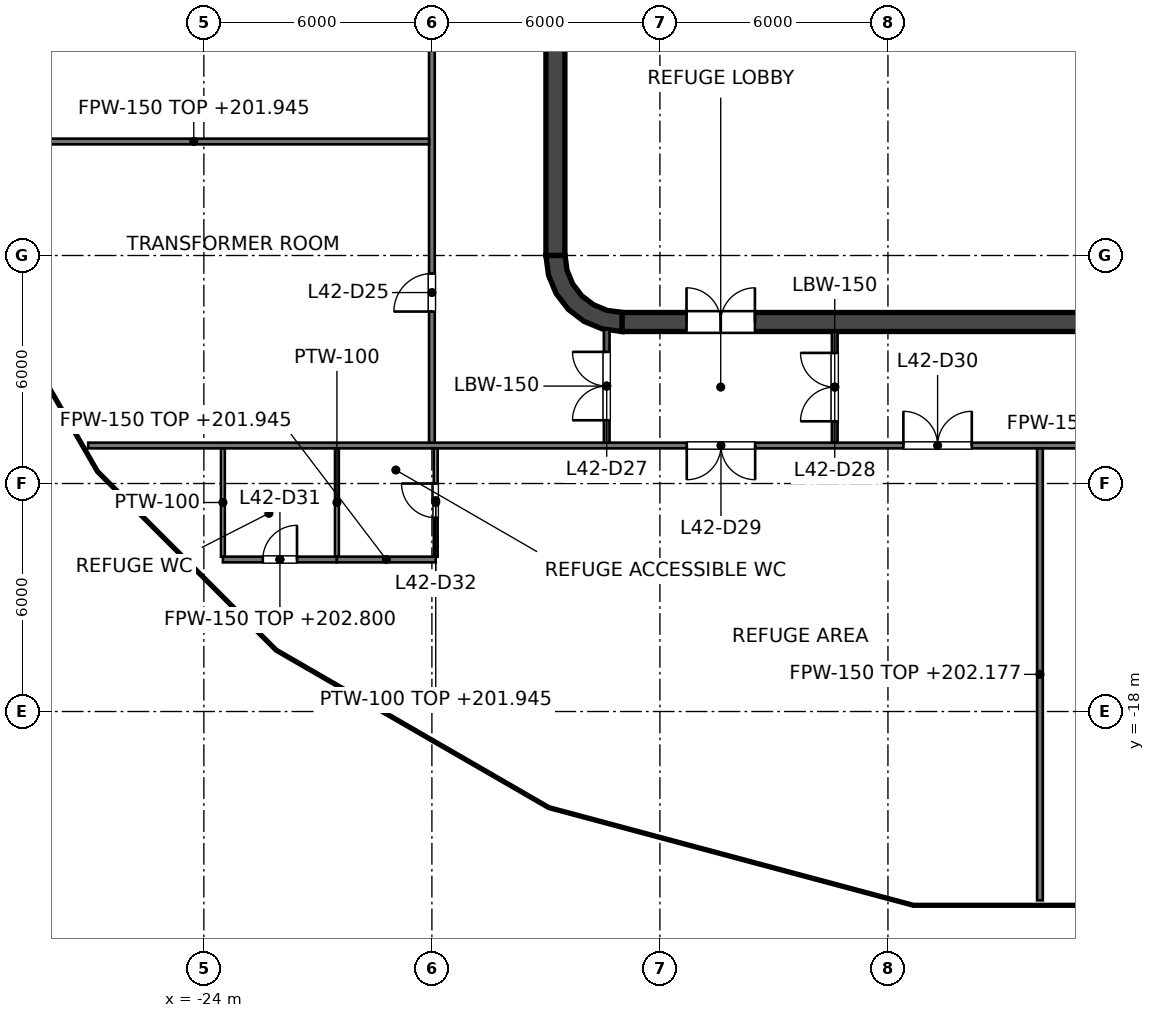
"""IFC4 building model, lengths in metres.
Left out: names, types, materials, properties, quantities, classifications, styles, units other than length and angle.
Written with IfcOpenShell. Run it as: python <this file> out.ifc"""

import sys

from ifc_helpers import new_model, si_unit, direction, frame, frame_2d, origin, place, context, subcontext, project, spatial, polyline, rectangle, outline, extrude, element, fill, save


model = new_model("IFC4")
c1 = context("Model", 3, precision=1e-05, world=origin(), true_north=direction((0.0, 1.0)))
c2 = subcontext(c1, "Body", "Model", "MODEL_VIEW")
j1 = project(units=[si_unit("LENGTHUNIT", "METRE"), si_unit("PLANEANGLEUNIT", "RADIAN")], contexts=[c1])
p1 = place(None, origin())
s1 = spatial("IfcSite", under=j1, at=p1, CompositionType="ELEMENT")
p2 = place(p1, origin())
s2 = spatial("IfcBuilding", under=s1, at=p2, CompositionType="ELEMENT")
p3 = place(p2, frame((0.0, 0.0, 197.6)))
s3 = spatial("IfcBuildingStorey", under=s2, at=p3, CompositionType="ELEMENT", Elevation=197.6)
p4 = place(p3, frame((-13.0, -7.75, 0.0), z_axis=(0.0, 0.0, 1.0), x_axis=(1.0, 0.0, 0.0)))
e1 = element("IfcWall", 1, at=p4, inside=s3, PredefinedType="SHEAR", context=c2, shape_type="SweptSolid", body=[
    extrude(rectangle(XDim=26.0, YDim=0.5, at=frame_2d((13.0, 0.0))), origin(), (0.0, 0.0, 1.0), 5.4),
])
p5 = place(p4, frame((1.7, 0.0, 0.0)))
e2 = element("IfcOpeningElement", 2, at=p5, cuts=e1, PredefinedType="OPENING", context=c2, shape_type="SweptSolid", body=[
    extrude(rectangle(XDim=1.8, YDim=2.1, at=frame_2d((0.9, 1.05))), frame((0.0, 0.25, 0.0), z_axis=(0.0, -1.0, 0.0), x_axis=(1.0, 0.0, 0.0)), (0.0, 0.0, 1.0), 0.5),
])
p6 = place(p4, frame((22.5, 0.0, 0.0)))
e3 = element("IfcOpeningElement", 3, at=p6, cuts=e1, PredefinedType="OPENING", context=c2, shape_type="SweptSolid", body=[
    extrude(rectangle(XDim=1.8, YDim=2.1, at=frame_2d((0.9, 1.05))), frame((0.0, 0.25, 0.0), z_axis=(0.0, -1.0, 0.0), x_axis=(1.0, 0.0, 0.0)), (0.0, 0.0, 1.0), 0.5),
])
p7 = place(p3, frame((-14.75, -6.0, 0.0), z_axis=(0.0, 0.0, 1.0), x_axis=(0.0, 1.0, 0.0)))
e4 = element("IfcWall", 4, at=p7, inside=s3, PredefinedType="SHEAR", context=c2, shape_type="SweptSolid", body=[
    extrude(rectangle(XDim=12.0, YDim=0.5, at=frame_2d((6.0, 0.0))), origin(), (0.0, 0.0, 1.0), 5.4),
])
p8 = place(p3, origin())
e5 = element("IfcWall", 5, at=p8, inside=s3, PredefinedType="SHEAR", context=c2, shape_type="SweptSolid", body=[
    extrude(outline(polyline([(-13.0, -8.0), (-13.0, -7.496), (-13.387, -7.445), (-13.748, -7.295), (-14.058, -7.058), (-14.295, -6.748), (-14.445, -6.387), (-14.496, -6.0), (-15.0, -6.0), (-14.932, -6.518), (-14.732, -7.0), (-14.414, -7.414), (-14.0, -7.732), (-13.518, -7.932), (-13.0, -8.0)])), origin(), (0.0, 0.0, 1.0), 5.4),
])
p9 = place(p3, frame((-9.0, -6.6, 0.0), z_axis=(0.0, 0.0, 1.0), x_axis=(0.0, 1.0, 0.0)))
e6 = element("IfcWall", 6, at=p9, inside=s3, PredefinedType="PARTITIONING", context=c2, shape_type="SweptSolid", body=[
    extrude(rectangle(XDim=2.5, YDim=0.25, at=frame_2d((1.25, 0.0))), origin(), (0.0, 0.0, 1.0), 5.2),
])
p10 = place(p9, frame((0.75, 0.0, 0.0)))
e7 = element("IfcOpeningElement", 7, at=p10, cuts=e6, PredefinedType="OPENING", context=c2, shape_type="SweptSolid", body=[
    extrude(rectangle(XDim=1.0, YDim=2.1, at=frame_2d((0.5, 1.05))), frame((0.0, 0.125, 0.0), z_axis=(0.0, -1.0, 0.0), x_axis=(1.0, 0.0, 0.0)), (0.0, 0.0, 1.0), 0.25),
])
p11 = place(p3, frame((-2.9, -6.6, 0.0), z_axis=(0.0, 0.0, 1.0), x_axis=(0.0, 1.0, 0.0)))
e8 = element("IfcWall", 8, at=p11, inside=s3, PredefinedType="PARTITIONING", context=c2, shape_type="SweptSolid", body=[
    extrude(rectangle(XDim=2.5, YDim=0.25, at=frame_2d((1.25, 0.0))), origin(), (0.0, 0.0, 1.0), 5.2),
])
p12 = place(p11, frame((0.8, 0.0, 0.0)))
e9 = element("IfcOpeningElement", 9, at=p12, cuts=e8, PredefinedType="OPENING", context=c2, shape_type="SweptSolid", body=[
    extrude(rectangle(XDim=0.9, YDim=2.1, at=frame_2d((0.45, 1.05))), frame((0.0, 0.125, 0.0), z_axis=(0.0, -1.0, 0.0), x_axis=(1.0, 0.0, 0.0)), (0.0, 0.0, 1.0), 0.25),
])
p13 = place(p3, frame((-9.125, -7.05, 0.0), z_axis=(0.0, 0.0, 1.0), x_axis=(1.0, 0.0, 0.0)))
e10 = element("IfcWall", 10, at=p13, inside=s3, PredefinedType="SOLIDWALL", context=c2, shape_type="SweptSolid", body=[
    extrude(rectangle(XDim=18.25, YDim=0.9, at=frame_2d((9.125, 0.0))), origin(), (0.0, 0.0, 1.0), 5.2),
])
p14 = place(p3, frame((-9.125, -1.525, 0.0), z_axis=(0.0, 0.0, 1.0), x_axis=(1.0, 0.0, 0.0)))
e11 = element("IfcWall", 11, at=p14, inside=s3, PredefinedType="SOLIDWALL", context=c2, shape_type="SweptSolid", body=[
    extrude(rectangle(XDim=18.25, YDim=0.25, at=frame_2d((9.125, 0.0))), origin(), (0.0, 0.0, 1.0), 5.2),
])
p15 = place(p14, frame((7.15, 0.0, 0.0)))
e12 = element("IfcOpeningElement", 12, at=p15, cuts=e11, PredefinedType="OPENING", context=c2, shape_type="SweptSolid", body=[
    extrude(rectangle(XDim=1.2, YDim=2.1, at=frame_2d((0.6, 1.05))), frame((0.0, 0.125, 0.0), z_axis=(0.0, -1.0, 0.0), x_axis=(1.0, 0.0, 0.0)), (0.0, 0.0, 1.0), 0.25),
])
p16 = place(p14, frame((10.2, 0.0, 0.0)))
e13 = element("IfcOpeningElement", 13, at=p16, cuts=e11, PredefinedType="OPENING", context=c2, shape_type="SweptSolid", body=[
    extrude(rectangle(XDim=1.2, YDim=2.1, at=frame_2d((0.6, 1.05))), frame((0.0, 0.125, 0.0), z_axis=(0.0, -1.0, 0.0), x_axis=(1.0, 0.0, 0.0)), (0.0, 0.0, 1.0), 0.25),
])
p17 = place(p14, frame((16.075, 0.0, 0.0)))
e14 = element("IfcOpeningElement", 14, at=p17, cuts=e11, PredefinedType="OPENING", context=c2, shape_type="SweptSolid", body=[
    extrude(rectangle(XDim=1.0, YDim=2.1, at=frame_2d((0.5, 1.05))), frame((0.0, 0.125, 0.0), z_axis=(0.0, -1.0, 0.0), x_axis=(1.0, 0.0, 0.0)), (0.0, 0.0, 1.0), 0.25),
])
p18 = place(p3, frame((-9.125, -3.975, 0.0), z_axis=(0.0, 0.0, 1.0), x_axis=(1.0, 0.0, 0.0)))
e15 = element("IfcWall", 15, at=p18, inside=s3, PredefinedType="SOLIDWALL", context=c2, shape_type="SweptSolid", body=[
    extrude(rectangle(XDim=12.4, YDim=0.25, at=frame_2d((6.2, 0.0))), origin(), (0.0, 0.0, 1.0), 5.2),
])
p19 = place(p18, frame((1.05, 0.0, 0.0)))
e16 = element("IfcOpeningElement", 16, at=p19, cuts=e15, PredefinedType="OPENING", context=c2, shape_type="SweptSolid", body=[
    extrude(rectangle(XDim=1.2, YDim=2.1, at=frame_2d((0.6, 1.05))), frame((0.0, 0.125, 0.0), z_axis=(0.0, -1.0, 0.0), x_axis=(1.0, 0.0, 0.0)), (0.0, 0.0, 1.0), 0.25),
])
p20 = place(p18, frame((4.1, 0.0, 0.0)))
e17 = element("IfcOpeningElement", 17, at=p20, cuts=e15, PredefinedType="OPENING", context=c2, shape_type="SweptSolid", body=[
    extrude(rectangle(XDim=1.2, YDim=2.1, at=frame_2d((0.6, 1.05))), frame((0.0, 0.125, 0.0), z_axis=(0.0, -1.0, 0.0), x_axis=(1.0, 0.0, 0.0)), (0.0, 0.0, 1.0), 0.25),
])
for number, where, z_axis, x_axis in (
    (18, (-9.0, -3.85, 0.0), (0.0, 0.0, 1.0), (0.0, 1.0, 0.0)),
    (19, (-5.95, -3.85, 0.0), (0.0, 0.0, 1.0), (0.0, 1.0, 0.0)),
    (20, (-2.9, -3.85, 0.0), (0.0, 0.0, 1.0), (0.0, 1.0, 0.0)),
):
    element("IfcWall", number, at=place(p3, frame(where, z_axis=z_axis, x_axis=x_axis)), inside=s3, PredefinedType="SOLIDWALL", context=c2, shape_type="SweptSolid", body=[
        extrude(rectangle(XDim=2.2, YDim=0.25, at=frame_2d((1.1, 0.0))), origin(), (0.0, 0.0, 1.0), 5.2),
    ])
p21 = place(p3, frame((-11.8, -7.5, 0.0), z_axis=(0.0, 0.0, 1.0), x_axis=(0.0, 1.0, 0.0)))
e21 = element("IfcWall", 21, at=p21, inside=s3, PredefinedType="SOLIDWALL", context=c2, shape_type="SweptSolid", body=[
    extrude(rectangle(XDim=15.0, YDim=0.4, at=frame_2d((7.5, 0.0))), origin(), (0.0, 0.0, 1.0), 5.2),
])
p22 = place(p21, frame((13.697, 0.0, 0.0)))
e22 = element("IfcOpeningElement", 22, at=p22, cuts=e21, PredefinedType="OPENING", context=c2, shape_type="SweptSolid", body=[
    extrude(rectangle(XDim=0.9, YDim=2.1, at=frame_2d((0.45, 1.05))), frame((0.0, 0.2, 0.0), z_axis=(0.0, -1.0, 0.0), x_axis=(1.0, 0.0, 0.0)), (0.0, 0.0, 1.0), 0.4),
])
p23 = place(p21, frame((0.403, 0.0, 0.0)))
e23 = element("IfcOpeningElement", 23, at=p23, cuts=e21, PredefinedType="OPENING", context=c2, shape_type="SweptSolid", body=[
    extrude(rectangle(XDim=0.9, YDim=2.1, at=frame_2d((0.45, 1.05))), frame((0.0, 0.2, 0.0), z_axis=(0.0, -1.0, 0.0), x_axis=(1.0, 0.0, 0.0)), (0.0, 0.0, 1.0), 0.4),
])
e24 = element("IfcWall", 24, at=p8, inside=s3, PredefinedType="SOLIDWALL", context=c2, shape_type="SweptSolid", body=[
    extrude(outline(polyline([(-12.0, -5.925), (-12.0, -5.675), (-14.25, -5.675), (-14.25, -3.025), (-12.0, -3.025), (-12.0, -2.775), (-14.25, -2.775), (-14.25, -0.125), (-12.0, -0.125), (-12.0, 0.125), (-14.25, 0.125), (-14.25, 2.775), (-12.0, 2.775), (-12.0, 3.025), (-14.25, 3.025), (-14.25, 5.675), (-12.0, 5.675), (-12.0, 5.925), (-14.25, 5.925), (-14.5, 5.925), (-14.5, 5.675), (-14.5, 3.025), (-14.5, 2.775), (-14.5, 0.125), (-14.5, -0.125), (-14.5, -2.775), (-14.5, -3.025), (-14.5, -5.675), (-14.5, -5.925), (-14.25, -5.925), (-12.0, -5.925)])), origin(), (0.0, 0.0, 1.0), 5.2),
])
p24 = place(p3, frame((-27.044, -11.0, 0.0), z_axis=(0.0, 0.0, 1.0), x_axis=(1.0, 0.0, 0.0)))
e25 = element("IfcWall", 25, at=p24, inside=s3, PredefinedType="PARTITIONING", context=c2, shape_type="SweptSolid", body=[
    extrude(rectangle(XDim=54.087, YDim=0.15, at=frame_2d((27.044, 0.0))), origin(), (0.0, 0.0, 1.0), 4.277),
])
p25 = place(p24, frame((36.0, 0.0, 0.0)))
e26 = element("IfcOpeningElement", 26, at=p25, cuts=e25, PredefinedType="OPENING", context=c2, shape_type="SweptSolid", body=[
    extrude(rectangle(XDim=1.0, YDim=2.1, at=frame_2d((0.5, 1.05))), frame((0.0, 0.075, 0.0), z_axis=(0.0, -1.0, 0.0), x_axis=(1.0, 0.0, 0.0)), (0.0, 0.0, 1.0), 0.15),
])
p26 = place(p24, frame((43.05, 0.0, 0.0)))
e27 = element("IfcOpeningElement", 27, at=p26, cuts=e25, PredefinedType="OPENING", context=c2, shape_type="SweptSolid", body=[
    extrude(rectangle(XDim=1.0, YDim=2.1, at=frame_2d((0.5, 1.05))), frame((0.0, 0.075, 0.0), z_axis=(0.0, -1.0, 0.0), x_axis=(1.0, 0.0, 0.0)), (0.0, 0.0, 1.0), 0.15),
])
p27 = place(p24, frame((15.75, 0.0, 0.0)))
e28 = element("IfcOpeningElement", 28, at=p27, cuts=e25, PredefinedType="OPENING", context=c2, shape_type="SweptSolid", body=[
    extrude(rectangle(XDim=1.8, YDim=2.1, at=frame_2d((0.9, 1.05))), frame((0.0, 0.075, 0.0), z_axis=(0.0, -1.0, 0.0), x_axis=(1.0, 0.0, 0.0)), (0.0, 0.0, 1.0), 0.15),
])
p28 = place(p24, frame((21.45, 0.0, 0.0)))
e29 = element("IfcOpeningElement", 29, at=p28, cuts=e25, PredefinedType="OPENING", context=c2, shape_type="SweptSolid", body=[
    extrude(rectangle(XDim=1.8, YDim=2.1, at=frame_2d((0.9, 1.05))), frame((0.0, 0.075, 0.0), z_axis=(0.0, -1.0, 0.0), x_axis=(1.0, 0.0, 0.0)), (0.0, 0.0, 1.0), 0.15),
])
p29 = place(p24, frame((27.15, 0.0, 0.0)))
e30 = element("IfcOpeningElement", 30, at=p29, cuts=e25, PredefinedType="OPENING", context=c2, shape_type="SweptSolid", body=[
    extrude(rectangle(XDim=1.8, YDim=2.1, at=frame_2d((0.9, 1.05))), frame((0.0, 0.075, 0.0), z_axis=(0.0, -1.0, 0.0), x_axis=(1.0, 0.0, 0.0)), (0.0, 0.0, 1.0), 0.15),
])
p30 = place(p3, frame((-18.0, -10.925, 0.0), z_axis=(0.0, 0.0, 1.0), x_axis=(0.0, 1.0, 0.0)))
e31 = element("IfcWall", 31, at=p30, inside=s3, PredefinedType="PARTITIONING", context=c2, shape_type="SweptSolid", body=[
    extrude(rectangle(XDim=21.85, YDim=0.15, at=frame_2d((10.925, 0.0))), origin(), (0.0, 0.0, 1.0), 4.277),
])
p31 = place(p30, frame((3.45, 0.0, 0.0)))
e32 = element("IfcOpeningElement", 32, at=p31, cuts=e31, PredefinedType="OPENING", context=c2, shape_type="SweptSolid", body=[
    extrude(rectangle(XDim=1.0, YDim=2.1, at=frame_2d((0.5, 1.05))), frame((0.0, 0.075, 0.0), z_axis=(0.0, -1.0, 0.0), x_axis=(1.0, 0.0, 0.0)), (0.0, 0.0, 1.0), 0.15),
])
p32 = place(p30, frame((14.425, 0.0, 0.0)))
e33 = element("IfcOpeningElement", 33, at=p32, cuts=e31, PredefinedType="OPENING", context=c2, shape_type="SweptSolid", body=[
    extrude(rectangle(XDim=1.0, YDim=2.1, at=frame_2d((0.5, 1.05))), frame((0.0, 0.075, 0.0), z_axis=(0.0, -1.0, 0.0), x_axis=(1.0, 0.0, 0.0)), (0.0, 0.0, 1.0), 0.15),
])
p33 = place(p3, frame((-2.0, -11.075, 0.0), z_axis=(0.0, 0.0, 1.0), x_axis=(0.0, -1.0, 0.0)))
e34 = element("IfcWall", 34, at=p33, inside=s3, PredefinedType="PARTITIONING", context=c2, shape_type="SweptSolid", body=[
    extrude(rectangle(XDim=11.894, YDim=0.15, at=frame_2d((5.947, 0.0))), origin(), (0.0, 0.0, 1.0), 4.577),
])
p34 = place(p3, frame((-13.4, -10.925, 0.0), z_axis=(0.0, 0.0, 1.0), x_axis=(0.0, 1.0, 0.0)))
e35 = element("IfcWall", 35, at=p34, inside=s3, PredefinedType="PARTITIONING", context=c2, shape_type="SweptSolid", body=[
    extrude(rectangle(XDim=2.978, YDim=0.15, at=frame_2d((1.489, 0.0))), origin(), (0.0, 0.0, 1.0), 4.345),
])
p35 = place(p34, frame((0.589, 0.0, 0.0)))
e36 = element("IfcOpeningElement", 36, at=p35, cuts=e35, PredefinedType="OPENING", context=c2, shape_type="SweptSolid", body=[
    extrude(rectangle(XDim=1.8, YDim=2.1, at=frame_2d((0.9, 1.05))), frame((0.0, 0.075, 0.0), z_axis=(0.0, -1.0, 0.0), x_axis=(1.0, 0.0, 0.0)), (0.0, 0.0, 1.0), 0.15),
])
p36 = place(p3, frame((-7.4, -10.925, 0.0), z_axis=(0.0, 0.0, 1.0), x_axis=(0.0, 1.0, 0.0)))
e37 = element("IfcWall", 37, at=p36, inside=s3, PredefinedType="PARTITIONING", context=c2, shape_type="SweptSolid", body=[
    extrude(rectangle(XDim=2.925, YDim=0.15, at=frame_2d((1.462, 0.0))), origin(), (0.0, 0.0, 1.0), 4.345),
])
p37 = place(p36, frame((0.562, 0.0, 0.0)))
e38 = element("IfcOpeningElement", 38, at=p37, cuts=e37, PredefinedType="OPENING", context=c2, shape_type="SweptSolid", body=[
    extrude(rectangle(XDim=1.8, YDim=2.1, at=frame_2d((0.9, 1.05))), frame((0.0, 0.075, 0.0), z_axis=(0.0, -1.0, 0.0), x_axis=(1.0, 0.0, 0.0)), (0.0, 0.0, 1.0), 0.15),
])
p38 = place(p3, frame((-18.075, -3.0, 0.0), z_axis=(0.0, 0.0, 1.0), x_axis=(-1.0, 0.0, 0.0)))
e39 = element("IfcWall", 39, at=p38, inside=s3, PredefinedType="PARTITIONING", context=c2, shape_type="SweptSolid", body=[
    extrude(rectangle(XDim=12.383, YDim=0.15, at=frame_2d((6.191, 0.0))), origin(), (0.0, 0.0, 1.0), 4.345),
])
p39 = place(p3, frame((-23.499, -14.0, 0.0), z_axis=(0.0, 0.0, 1.0), x_axis=(1.0, 0.0, 0.0)))
e40 = element("IfcWall", 40, at=p39, inside=s3, PredefinedType="PARTITIONING", context=c2, shape_type="SweptSolid", body=[
    extrude(rectangle(XDim=3.0, YDim=0.15, at=frame_2d((1.5, 0.0))), origin(), (0.0, 0.0, 1.0), 5.2),
])
p40 = place(p39, frame((1.05, 0.0, 0.0)))
e41 = element("IfcOpeningElement", 41, at=p40, cuts=e40, PredefinedType="OPENING", context=c2, shape_type="SweptSolid", body=[
    extrude(rectangle(XDim=0.9, YDim=2.1, at=frame_2d((0.45, 1.05))), frame((0.0, 0.075, 0.0), z_axis=(0.0, -1.0, 0.0), x_axis=(1.0, 0.0, 0.0)), (0.0, 0.0, 1.0), 0.15),
])
p41 = place(p3, frame((-20.499, -14.0, 0.0), z_axis=(0.0, 0.0, 1.0), x_axis=(1.0, 0.0, 0.0)))
e42 = element("IfcWall", 42, at=p41, inside=s3, PredefinedType="PARTITIONING", context=c2, shape_type="SweptSolid", body=[
    extrude(rectangle(XDim=2.6, YDim=0.15, at=frame_2d((1.3, 0.0))), origin(), (0.0, 0.0, 1.0), 4.345),
])
for number, where, z_axis, x_axis in (
    (43, (-23.499, -13.925, 0.0), (0.0, 0.0, 1.0), (0.0, 1.0, 0.0)),
    (44, (-20.499, -13.925, 0.0), (0.0, 0.0, 1.0), (0.0, 1.0, 0.0)),
):
    element("IfcWall", number, at=place(p3, frame(where, z_axis=z_axis, x_axis=x_axis)), inside=s3, PredefinedType="PARTITIONING", context=c2, shape_type="SweptSolid", body=[
        extrude(rectangle(XDim=2.85, YDim=0.1, at=frame_2d((1.425, 0.0))), origin(), (0.0, 0.0, 1.0), 4.502),
    ])
p42 = place(p3, frame((-17.899, -13.925, 0.0), z_axis=(0.0, 0.0, 1.0), x_axis=(0.0, 1.0, 0.0)))
e45 = element("IfcWall", 45, at=p42, inside=s3, PredefinedType="PARTITIONING", context=c2, shape_type="SweptSolid", body=[
    extrude(rectangle(XDim=2.85, YDim=0.1, at=frame_2d((1.425, 0.0))), origin(), (0.0, 0.0, 1.0), 4.345),
])
p43 = place(p42, frame((1.025, 0.0, 0.0)))
e46 = element("IfcOpeningElement", 46, at=p43, cuts=e45, PredefinedType="OPENING", context=c2, shape_type="SweptSolid", body=[
    extrude(rectangle(XDim=0.9, YDim=2.1, at=frame_2d((0.45, 1.05))), frame((0.0, 0.05, 0.0), z_axis=(0.0, -1.0, 0.0), x_axis=(1.0, 0.0, 0.0)), (0.0, 0.0, 1.0), 0.1),
])
p44 = place(p19, origin())
e47 = element("IfcDoor", 47, at=p44, inside=s3, OperationType="DOUBLE_DOOR_SLIDING", PredefinedType="DOOR", context=c2, shape_type="SweptSolid", body=[
    extrude(rectangle(XDim=1.2, YDim=2.1, at=frame_2d((0.6, 1.05))), frame((0.0, 0.025, 0.0), z_axis=(0.0, -1.0, 0.0), x_axis=(1.0, 0.0, 0.0)), (0.0, 0.0, 1.0), 0.05),
])
fill(e16, e47)
p45 = place(p20, origin())
e48 = element("IfcDoor", 48, at=p45, inside=s3, OperationType="DOUBLE_DOOR_SLIDING", PredefinedType="DOOR", context=c2, shape_type="SweptSolid", body=[
    extrude(rectangle(XDim=1.2, YDim=2.1, at=frame_2d((0.6, 1.05))), frame((0.0, 0.025, 0.0), z_axis=(0.0, -1.0, 0.0), x_axis=(1.0, 0.0, 0.0)), (0.0, 0.0, 1.0), 0.05),
])
fill(e17, e48)
p46 = place(p15, origin())
e49 = element("IfcDoor", 49, at=p46, inside=s3, OperationType="DOUBLE_DOOR_SLIDING", PredefinedType="DOOR", context=c2, shape_type="SweptSolid", body=[
    extrude(rectangle(XDim=1.2, YDim=2.1, at=frame_2d((0.6, 1.05))), frame((0.0, 0.025, 0.0), z_axis=(0.0, -1.0, 0.0), x_axis=(1.0, 0.0, 0.0)), (0.0, 0.0, 1.0), 0.05),
])
fill(e12, e49)
p47 = place(p10, origin())
e50 = element("IfcDoor", 50, at=p47, inside=s3, OperationType="SINGLE_SWING_LEFT", PredefinedType="DOOR", context=c2, shape_type="SweptSolid", body=[
    extrude(rectangle(XDim=1.0, YDim=2.1, at=frame_2d((0.5, 1.05))), frame((0.0, 0.025, 0.0), z_axis=(0.0, -1.0, 0.0), x_axis=(1.0, 0.0, 0.0)), (0.0, 0.0, 1.0), 0.05),
])
fill(e7, e50)
p48 = place(p12, origin())
e51 = element("IfcDoor", 51, at=p48, inside=s3, OperationType="SINGLE_SWING_RIGHT", PredefinedType="DOOR", context=c2, shape_type="SweptSolid", body=[
    extrude(rectangle(XDim=0.9, YDim=2.1, at=frame_2d((0.45, 1.05))), frame((0.0, 0.025, 0.0), z_axis=(0.0, -1.0, 0.0), x_axis=(1.0, 0.0, 0.0)), (0.0, 0.0, 1.0), 0.05),
])
fill(e9, e51)
p49 = place(p23, origin())
e52 = element("IfcDoor", 52, at=p49, inside=s3, OperationType="SINGLE_SWING_LEFT", PredefinedType="DOOR", context=c2, shape_type="SweptSolid", body=[
    extrude(rectangle(XDim=0.9, YDim=2.1, at=frame_2d((0.45, 1.05))), frame((0.0, 0.025, 0.0), z_axis=(0.0, -1.0, 0.0), x_axis=(1.0, 0.0, 0.0)), (0.0, 0.0, 1.0), 0.05),
])
fill(e23, e52)
p50 = place(p5, origin())
e53 = element("IfcDoor", 53, at=p50, inside=s3, OperationType="DOUBLE_DOOR_SINGLE_SWING", PredefinedType="DOOR", context=c2, shape_type="SweptSolid", body=[
    extrude(rectangle(XDim=1.8, YDim=2.1, at=frame_2d((0.9, 1.05))), frame((0.0, 0.025, 0.0), z_axis=(0.0, -1.0, 0.0), x_axis=(1.0, 0.0, 0.0)), (0.0, 0.0, 1.0), 0.05),
])
fill(e2, e53)
p51 = place(p31, origin())
e54 = element("IfcDoor", 54, at=p51, inside=s3, OperationType="SINGLE_SWING_LEFT", PredefinedType="DOOR", context=c2, shape_type="SweptSolid", body=[
    extrude(rectangle(XDim=1.0, YDim=2.1, at=frame_2d((0.5, 1.05))), frame((0.0, 0.025, 0.0), z_axis=(0.0, -1.0, 0.0), x_axis=(1.0, 0.0, 0.0)), (0.0, 0.0, 1.0), 0.05),
])
fill(e32, e54)
p52 = place(p35, origin())
e55 = element("IfcDoor", 55, at=p52, inside=s3, OperationType="DOUBLE_DOOR_SINGLE_SWING", PredefinedType="DOOR", context=c2, shape_type="SweptSolid", body=[
    extrude(rectangle(XDim=1.8, YDim=2.1, at=frame_2d((0.9, 1.05))), frame((0.0, 0.025, 0.0), z_axis=(0.0, -1.0, 0.0), x_axis=(1.0, 0.0, 0.0)), (0.0, 0.0, 1.0), 0.05),
])
fill(e36, e55)
p53 = place(p37, origin())
e56 = element("IfcDoor", 56, at=p53, inside=s3, OperationType="DOUBLE_DOOR_SINGLE_SWING", PredefinedType="DOOR", context=c2, shape_type="SweptSolid", body=[
    extrude(rectangle(XDim=1.8, YDim=2.1, at=frame_2d((0.9, 1.05))), frame((0.0, 0.025, 0.0), z_axis=(0.0, -1.0, 0.0), x_axis=(1.0, 0.0, 0.0)), (0.0, 0.0, 1.0), 0.05),
])
fill(e38, e56)
p54 = place(p27, origin())
e57 = element("IfcDoor", 57, at=p54, inside=s3, OperationType="DOUBLE_DOOR_SINGLE_SWING", PredefinedType="DOOR", context=c2, shape_type="SweptSolid", body=[
    extrude(rectangle(XDim=1.8, YDim=2.1, at=frame_2d((0.9, 1.05))), frame((0.0, 0.025, 0.0), z_axis=(0.0, -1.0, 0.0), x_axis=(1.0, 0.0, 0.0)), (0.0, 0.0, 1.0), 0.05),
])
fill(e28, e57)
p55 = place(p28, origin())
e58 = element("IfcDoor", 58, at=p55, inside=s3, OperationType="DOUBLE_DOOR_SINGLE_SWING", PredefinedType="DOOR", context=c2, shape_type="SweptSolid", body=[
    extrude(rectangle(XDim=1.8, YDim=2.1, at=frame_2d((0.9, 1.05))), frame((0.0, 0.025, 0.0), z_axis=(0.0, -1.0, 0.0), x_axis=(1.0, 0.0, 0.0)), (0.0, 0.0, 1.0), 0.05),
])
fill(e29, e58)
p56 = place(p40, origin())
e59 = element("IfcDoor", 59, at=p56, inside=s3, OperationType="SINGLE_SWING_RIGHT", PredefinedType="DOOR", context=c2, shape_type="SweptSolid", body=[
    extrude(rectangle(XDim=0.9, YDim=2.1, at=frame_2d((0.45, 1.05))), frame((0.0, 0.025, 0.0), z_axis=(0.0, -1.0, 0.0), x_axis=(1.0, 0.0, 0.0)), (0.0, 0.0, 1.0), 0.05),
])
fill(e41, e59)
p57 = place(p43, origin())
e60 = element("IfcDoor", 60, at=p57, inside=s3, OperationType="SINGLE_SWING_RIGHT", PredefinedType="DOOR", context=c2, shape_type="SweptSolid", body=[
    extrude(rectangle(XDim=0.9, YDim=2.1, at=frame_2d((0.45, 1.05))), frame((0.0, 0.025, 0.0), z_axis=(0.0, -1.0, 0.0), x_axis=(1.0, 0.0, 0.0)), (0.0, 0.0, 1.0), 0.05),
])
fill(e46, e60)
save(model, sys.argv[1])
